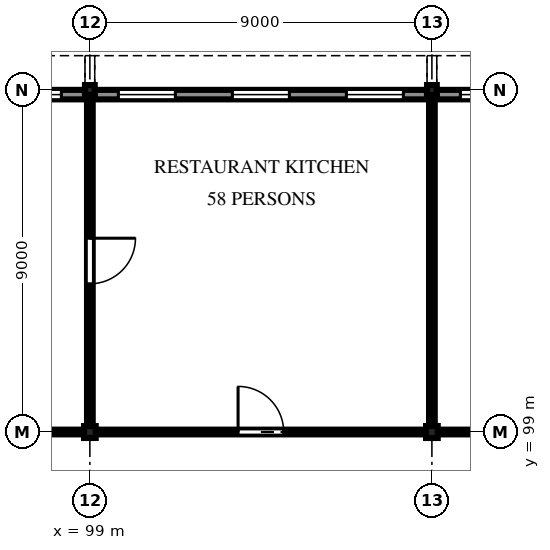
"""IFC4 building model, lengths in metres.
Left out: names, types, materials, properties, quantities, classifications, styles, units other than length and angle.
Written with IfcOpenShell. Run it as: python <this file> out.ifc"""

import sys

from ifc_helpers import new_model, si_unit, direction, frame, frame_2d, origin, origin_2d, place, context, subcontext, project, spatial, polyline, rectangle, i_section, outline, extrude, element, fill, save


model = new_model("IFC4")
c1 = context("Model", 3, precision=1e-05, world=origin(), true_north=direction((0.0, 1.0)))
c2 = subcontext(c1, "Body", "Model", "MODEL_VIEW")
j1 = project(units=[si_unit("LENGTHUNIT", "METRE"), si_unit("PLANEANGLEUNIT", "RADIAN")], contexts=[c1])
p1 = place(None, origin())
s1 = spatial("IfcSite", under=j1, at=p1, CompositionType="ELEMENT")
p2 = place(p1, origin())
s2 = spatial("IfcBuilding", under=s1, at=p2, CompositionType="ELEMENT")
p3 = place(p2, frame((0.0, 0.0, 7.5)))
s3 = spatial("IfcBuildingStorey", under=s2, at=p3, CompositionType="ELEMENT", Elevation=7.5)
p4 = place(p3, frame((99.0, 99.0, 0.0), z_axis=(0.0, 0.0, 1.0), x_axis=(1.0, 0.0, 0.0)))
e1 = element("IfcColumn", 1, at=p4, inside=s3, PredefinedType="COLUMN", context=c2, shape_type="SweptSolid", body=[
    extrude(i_section(OverallWidth=0.307, OverallDepth=0.314, WebThickness=0.012, FlangeThickness=0.019, FilletRadius=0.015, at=origin_2d()), origin(), (0.0, 0.0, 1.0), 4.2),
])
p5 = place(p3, frame((99.0, 108.0, 0.0), z_axis=(0.0, 0.0, 1.0), x_axis=(1.0, 0.0, 0.0)))
e2 = element("IfcColumn", 2, at=p5, inside=s3, PredefinedType="COLUMN", context=c2, shape_type="SweptSolid", body=[
    extrude(i_section(OverallWidth=0.256, OverallDepth=0.26, WebThickness=0.01, FlangeThickness=0.017, FilletRadius=0.013, at=origin_2d()), origin(), (0.0, 0.0, 1.0), 4.2),
])
p6 = place(p3, frame((108.0, 99.0, 0.0), z_axis=(0.0, 0.0, 1.0), x_axis=(1.0, 0.0, 0.0)))
e3 = element("IfcColumn", 3, at=p6, inside=s3, PredefinedType="COLUMN", context=c2, shape_type="SweptSolid", body=[
    extrude(i_section(OverallWidth=0.307, OverallDepth=0.314, WebThickness=0.012, FlangeThickness=0.019, FilletRadius=0.015, at=origin_2d()), origin(), (0.0, 0.0, 1.0), 4.2),
])
p7 = place(p3, frame((108.0, 108.0, 0.0), z_axis=(0.0, 0.0, 1.0), x_axis=(1.0, 0.0, 0.0)))
e4 = element("IfcColumn", 4, at=p7, inside=s3, PredefinedType="COLUMN", context=c2, shape_type="SweptSolid", body=[
    extrude(i_section(OverallWidth=0.256, OverallDepth=0.26, WebThickness=0.01, FlangeThickness=0.017, FilletRadius=0.013, at=origin_2d()), origin(), (0.0, 0.0, 1.0), 4.2),
])
p8 = place(p3, frame((90.128, 107.878, 0.0), z_axis=(0.0, 0.0, 1.0), x_axis=(1.0, 0.0, 0.0)))
e5 = element("IfcWall", 5, at=p8, inside=s3, PredefinedType="SOLIDWALL", context=c2, shape_type="SweptSolid", body=[
    extrude(rectangle(XDim=8.744, YDim=0.25, at=frame_2d((4.372, 0.0))), origin(), (0.0, 0.0, 1.0), 4.05),
])
p9 = place(p8, frame((0.622, 0.0, 0.9)))
e6 = element("IfcOpeningElement", 6, at=p9, cuts=e5, PredefinedType="OPENING", context=c2, shape_type="SweptSolid", body=[
    extrude(rectangle(XDim=1.5, YDim=2.4, at=frame_2d((0.75, 1.2))), frame((0.0, 0.135, 0.0), z_axis=(0.0, -1.0, 0.0), x_axis=(1.0, 0.0, 0.0)), (0.0, 0.0, 1.0), 0.27),
])
p10 = place(p8, frame((3.622, 0.0, 0.9)))
e7 = element("IfcOpeningElement", 7, at=p10, cuts=e5, PredefinedType="OPENING", context=c2, shape_type="SweptSolid", body=[
    extrude(rectangle(XDim=1.5, YDim=2.4, at=frame_2d((0.75, 1.2))), frame((0.0, 0.135, 0.0), z_axis=(0.0, -1.0, 0.0), x_axis=(1.0, 0.0, 0.0)), (0.0, 0.0, 1.0), 0.27),
])
p11 = place(p8, frame((6.622, 0.0, 0.9)))
e8 = element("IfcOpeningElement", 8, at=p11, cuts=e5, PredefinedType="OPENING", context=c2, shape_type="SweptSolid", body=[
    extrude(rectangle(XDim=1.5, YDim=2.4, at=frame_2d((0.75, 1.2))), frame((0.0, 0.135, 0.0), z_axis=(0.0, -1.0, 0.0), x_axis=(1.0, 0.0, 0.0)), (0.0, 0.0, 1.0), 0.27),
])
p12 = place(p3, frame((99.128, 107.878, 0.0), z_axis=(0.0, 0.0, 1.0), x_axis=(1.0, 0.0, 0.0)))
e9 = element("IfcWall", 9, at=p12, inside=s3, PredefinedType="SOLIDWALL", context=c2, shape_type="SweptSolid", body=[
    extrude(rectangle(XDim=8.744, YDim=0.25, at=frame_2d((4.372, 0.0))), origin(), (0.0, 0.0, 1.0), 4.05),
])
p13 = place(p12, frame((0.622, 0.0, 0.9)))
e10 = element("IfcOpeningElement", 10, at=p13, cuts=e9, PredefinedType="OPENING", context=c2, shape_type="SweptSolid", body=[
    extrude(rectangle(XDim=1.5, YDim=2.4, at=frame_2d((0.75, 1.2))), frame((0.0, 0.135, 0.0), z_axis=(0.0, -1.0, 0.0), x_axis=(1.0, 0.0, 0.0)), (0.0, 0.0, 1.0), 0.27),
])
p14 = place(p12, frame((3.622, 0.0, 0.9)))
e11 = element("IfcOpeningElement", 11, at=p14, cuts=e9, PredefinedType="OPENING", context=c2, shape_type="SweptSolid", body=[
    extrude(rectangle(XDim=1.5, YDim=2.4, at=frame_2d((0.75, 1.2))), frame((0.0, 0.135, 0.0), z_axis=(0.0, -1.0, 0.0), x_axis=(1.0, 0.0, 0.0)), (0.0, 0.0, 1.0), 0.27),
])
p15 = place(p12, frame((6.622, 0.0, 0.9)))
e12 = element("IfcOpeningElement", 12, at=p15, cuts=e9, PredefinedType="OPENING", context=c2, shape_type="SweptSolid", body=[
    extrude(rectangle(XDim=1.5, YDim=2.4, at=frame_2d((0.75, 1.2))), frame((0.0, 0.135, 0.0), z_axis=(0.0, -1.0, 0.0), x_axis=(1.0, 0.0, 0.0)), (0.0, 0.0, 1.0), 0.27),
])
p16 = place(p3, frame((108.128, 107.878, 0.0), z_axis=(0.0, 0.0, 1.0), x_axis=(1.0, 0.0, 0.0)))
e13 = element("IfcWall", 13, at=p16, inside=s3, PredefinedType="SOLIDWALL", context=c2, shape_type="SweptSolid", body=[
    extrude(rectangle(XDim=8.744, YDim=0.25, at=frame_2d((4.372, 0.0))), origin(), (0.0, 0.0, 1.0), 4.05),
])
p17 = place(p16, frame((0.622, 0.0, 0.9)))
e14 = element("IfcOpeningElement", 14, at=p17, cuts=e13, PredefinedType="OPENING", context=c2, shape_type="SweptSolid", body=[
    extrude(rectangle(XDim=1.5, YDim=2.4, at=frame_2d((0.75, 1.2))), frame((0.0, 0.135, 0.0), z_axis=(0.0, -1.0, 0.0), x_axis=(1.0, 0.0, 0.0)), (0.0, 0.0, 1.0), 0.27),
])
p18 = place(p16, frame((3.622, 0.0, 0.9)))
e15 = element("IfcOpeningElement", 15, at=p18, cuts=e13, PredefinedType="OPENING", context=c2, shape_type="SweptSolid", body=[
    extrude(rectangle(XDim=1.5, YDim=2.4, at=frame_2d((0.75, 1.2))), frame((0.0, 0.135, 0.0), z_axis=(0.0, -1.0, 0.0), x_axis=(1.0, 0.0, 0.0)), (0.0, 0.0, 1.0), 0.27),
])
p19 = place(p16, frame((6.622, 0.0, 0.9)))
e16 = element("IfcOpeningElement", 16, at=p19, cuts=e13, PredefinedType="OPENING", context=c2, shape_type="SweptSolid", body=[
    extrude(rectangle(XDim=1.5, YDim=2.4, at=frame_2d((0.75, 1.2))), frame((0.0, 0.135, 0.0), z_axis=(0.0, -1.0, 0.0), x_axis=(1.0, 0.0, 0.0)), (0.0, 0.0, 1.0), 0.27),
])
p20 = place(p3, frame((108.154, 99.0, 0.0), z_axis=(0.0, 0.0, 1.0), x_axis=(1.0, 0.0, 0.0)))
e17 = element("IfcWall", 17, at=p20, inside=s3, PredefinedType="PARTITIONING", context=c2, shape_type="SweptSolid", body=[
    extrude(rectangle(XDim=8.692, YDim=0.125, at=frame_2d((4.346, 0.0))), origin(), (0.0, 0.0, 1.0), 3.307),
])
p21 = place(p20, frame((3.846, 0.0, 0.0)))
e18 = element("IfcOpeningElement", 18, at=p21, cuts=e17, PredefinedType="OPENING", context=c2, shape_type="SweptSolid", body=[
    extrude(rectangle(XDim=1.0, YDim=2.1, at=frame_2d((0.5, 1.05))), frame((0.0, 0.073, 0.0), z_axis=(0.0, -1.0, 0.0), x_axis=(1.0, 0.0, 0.0)), (0.0, 0.0, 1.0), 0.145),
])
p22 = place(p3, frame((99.154, 99.0, 0.0), z_axis=(0.0, 0.0, 1.0), x_axis=(1.0, 0.0, 0.0)))
e19 = element("IfcWall", 19, at=p22, inside=s3, PredefinedType="PARTITIONING", context=c2, shape_type="SweptSolid", body=[
    extrude(rectangle(XDim=8.692, YDim=0.125, at=frame_2d((4.346, 0.0))), origin(), (0.0, 0.0, 1.0), 3.307),
])
p23 = place(p22, frame((3.746, 0.0, 0.0)))
e20 = element("IfcOpeningElement", 20, at=p23, cuts=e19, PredefinedType="OPENING", context=c2, shape_type="SweptSolid", body=[
    extrude(rectangle(XDim=1.2, YDim=2.1, at=frame_2d((0.6, 1.05))), frame((0.0, 0.073, 0.0), z_axis=(0.0, -1.0, 0.0), x_axis=(1.0, 0.0, 0.0)), (0.0, 0.0, 1.0), 0.145),
])
p24 = place(p3, frame((90.154, 99.0, 0.0), z_axis=(0.0, 0.0, 1.0), x_axis=(1.0, 0.0, 0.0)))
e21 = element("IfcWall", 21, at=p24, inside=s3, PredefinedType="PARTITIONING", context=c2, shape_type="SweptSolid", body=[
    extrude(rectangle(XDim=8.692, YDim=0.125, at=frame_2d((4.346, 0.0))), origin(), (0.0, 0.0, 1.0), 3.307),
])
p25 = place(p24, frame((3.346, 0.0, 0.0)))
e22 = element("IfcOpeningElement", 22, at=p25, cuts=e21, PredefinedType="OPENING", context=c2, shape_type="SweptSolid", body=[
    extrude(rectangle(XDim=2.0, YDim=2.4, at=frame_2d((1.0, 1.2))), frame((0.0, 0.073, 0.0), z_axis=(0.0, -1.0, 0.0), x_axis=(1.0, 0.0, 0.0)), (0.0, 0.0, 1.0), 0.145),
])
p26 = place(p3, frame((99.0, 107.87, 0.0), z_axis=(0.0, 0.0, 1.0), x_axis=(0.0, -1.0, 0.0)))
e23 = element("IfcWall", 23, at=p26, inside=s3, PredefinedType="PARTITIONING", context=c2, shape_type="SweptSolid", body=[
    extrude(rectangle(XDim=8.713, YDim=0.15, at=frame_2d((4.356, 0.0))), origin(), (0.0, 0.0, 1.0), 3.307),
])
p27 = place(p26, frame((3.77, 0.0, 0.0)))
e24 = element("IfcOpeningElement", 24, at=p27, cuts=e23, PredefinedType="OPENING", context=c2, shape_type="SweptSolid", body=[
    extrude(rectangle(XDim=1.2, YDim=2.1, at=frame_2d((0.6, 1.05))), frame((0.0, 0.085, 0.0), z_axis=(0.0, -1.0, 0.0), x_axis=(1.0, 0.0, 0.0)), (0.0, 0.0, 1.0), 0.17),
])
p28 = place(p3, frame((108.0, 107.87, 0.0), z_axis=(0.0, 0.0, 1.0), x_axis=(0.0, -1.0, 0.0)))
e25 = element("IfcWall", 25, at=p28, inside=s3, PredefinedType="PARTITIONING", context=c2, shape_type="SweptSolid", body=[
    extrude(rectangle(XDim=8.713, YDim=0.15, at=frame_2d((4.356, 0.0))), origin(), (0.0, 0.0, 1.0), 3.307),
])
p29 = place(p11, origin())
e26 = element("IfcWindow", 26, at=p29, inside=s3, PartitioningType="DOUBLE_PANEL_VERTICAL", PredefinedType="WINDOW", context=c2, shape_type="SweptSolid", body=[
    extrude(outline(polyline([(0.0, 0.0), (1.5, 0.0), (1.5, 2.4), (0.0, 2.4), (0.0, 0.0)]), holes=[polyline([(0.07, 0.07), (1.43, 0.07), (1.43, 2.33), (0.07, 2.33), (0.07, 0.07)])]), frame((0.0, 0.03, 0.0), z_axis=(0.0, -1.0, 0.0), x_axis=(1.0, 0.0, 0.0)), (0.0, 0.0, 1.0), 0.06),
    extrude(rectangle(XDim=0.04, YDim=2.26, at=frame_2d((0.75, 1.2))), frame((0.0, 0.022, 0.0), z_axis=(0.0, -1.0, 0.0), x_axis=(1.0, 0.0, 0.0)), (0.0, 0.0, 1.0), 0.044),
    extrude(outline(polyline([(0.07, 0.07), (0.73, 0.07), (0.73, 2.33), (0.07, 2.33), (0.07, 0.07)]), holes=[polyline([(0.1, 0.1), (0.7, 0.1), (0.7, 2.3), (0.1, 2.3), (0.1, 0.1)])]), frame((0.0, 0.022, 0.0), z_axis=(0.0, -1.0, 0.0), x_axis=(1.0, 0.0, 0.0)), (0.0, 0.0, 1.0), 0.045),
    extrude(rectangle(XDim=0.6, YDim=2.2, at=frame_2d((0.4, 1.2))), frame((0.0, 0.006, 0.0), z_axis=(0.0, -1.0, 0.0), x_axis=(1.0, 0.0, 0.0)), (0.0, 0.0, 1.0), 0.012),
    extrude(outline(polyline([(0.77, 0.07), (1.43, 0.07), (1.43, 2.33), (0.77, 2.33), (0.77, 0.07)]), holes=[polyline([(0.8, 0.1), (1.4, 0.1), (1.4, 2.3), (0.8, 2.3), (0.8, 0.1)])]), frame((0.0, 0.022, 0.0), z_axis=(0.0, -1.0, 0.0), x_axis=(1.0, 0.0, 0.0)), (0.0, 0.0, 1.0), 0.045),
    extrude(rectangle(XDim=0.6, YDim=2.2, at=frame_2d((1.1, 1.2))), frame((0.0, 0.006, 0.0), z_axis=(0.0, -1.0, 0.0), x_axis=(1.0, 0.0, 0.0)), (0.0, 0.0, 1.0), 0.012),
])
fill(e8, e26)
p30 = place(p13, origin())
e27 = element("IfcWindow", 27, at=p30, inside=s3, PartitioningType="DOUBLE_PANEL_VERTICAL", PredefinedType="WINDOW", context=c2, shape_type="SweptSolid", body=[
    extrude(outline(polyline([(0.0, 0.0), (1.5, 0.0), (1.5, 2.4), (0.0, 2.4), (0.0, 0.0)]), holes=[polyline([(0.07, 0.07), (1.43, 0.07), (1.43, 2.33), (0.07, 2.33), (0.07, 0.07)])]), frame((0.0, 0.03, 0.0), z_axis=(0.0, -1.0, 0.0), x_axis=(1.0, 0.0, 0.0)), (0.0, 0.0, 1.0), 0.06),
    extrude(rectangle(XDim=0.04, YDim=2.26, at=frame_2d((0.75, 1.2))), frame((0.0, 0.022, 0.0), z_axis=(0.0, -1.0, 0.0), x_axis=(1.0, 0.0, 0.0)), (0.0, 0.0, 1.0), 0.044),
    extrude(outline(polyline([(0.07, 0.07), (0.73, 0.07), (0.73, 2.33), (0.07, 2.33), (0.07, 0.07)]), holes=[polyline([(0.1, 0.1), (0.7, 0.1), (0.7, 2.3), (0.1, 2.3), (0.1, 0.1)])]), frame((0.0, 0.022, 0.0), z_axis=(0.0, -1.0, 0.0), x_axis=(1.0, 0.0, 0.0)), (0.0, 0.0, 1.0), 0.045),
    extrude(rectangle(XDim=0.6, YDim=2.2, at=frame_2d((0.4, 1.2))), frame((0.0, 0.006, 0.0), z_axis=(0.0, -1.0, 0.0), x_axis=(1.0, 0.0, 0.0)), (0.0, 0.0, 1.0), 0.012),
    extrude(outline(polyline([(0.77, 0.07), (1.43, 0.07), (1.43, 2.33), (0.77, 2.33), (0.77, 0.07)]), holes=[polyline([(0.8, 0.1), (1.4, 0.1), (1.4, 2.3), (0.8, 2.3), (0.8, 0.1)])]), frame((0.0, 0.022, 0.0), z_axis=(0.0, -1.0, 0.0), x_axis=(1.0, 0.0, 0.0)), (0.0, 0.0, 1.0), 0.045),
    extrude(rectangle(XDim=0.6, YDim=2.2, at=frame_2d((1.1, 1.2))), frame((0.0, 0.006, 0.0), z_axis=(0.0, -1.0, 0.0), x_axis=(1.0, 0.0, 0.0)), (0.0, 0.0, 1.0), 0.012),
])
fill(e10, e27)
p31 = place(p14, origin())
e28 = element("IfcWindow", 28, at=p31, inside=s3, PartitioningType="DOUBLE_PANEL_VERTICAL", PredefinedType="WINDOW", context=c2, shape_type="SweptSolid", body=[
    extrude(outline(polyline([(0.0, 0.0), (1.5, 0.0), (1.5, 2.4), (0.0, 2.4), (0.0, 0.0)]), holes=[polyline([(0.07, 0.07), (1.43, 0.07), (1.43, 2.33), (0.07, 2.33), (0.07, 0.07)])]), frame((0.0, 0.03, 0.0), z_axis=(0.0, -1.0, 0.0), x_axis=(1.0, 0.0, 0.0)), (0.0, 0.0, 1.0), 0.06),
    extrude(rectangle(XDim=0.04, YDim=2.26, at=frame_2d((0.75, 1.2))), frame((0.0, 0.022, 0.0), z_axis=(0.0, -1.0, 0.0), x_axis=(1.0, 0.0, 0.0)), (0.0, 0.0, 1.0), 0.044),
    extrude(outline(polyline([(0.07, 0.07), (0.73, 0.07), (0.73, 2.33), (0.07, 2.33), (0.07, 0.07)]), holes=[polyline([(0.1, 0.1), (0.7, 0.1), (0.7, 2.3), (0.1, 2.3), (0.1, 0.1)])]), frame((0.0, 0.022, 0.0), z_axis=(0.0, -1.0, 0.0), x_axis=(1.0, 0.0, 0.0)), (0.0, 0.0, 1.0), 0.045),
    extrude(rectangle(XDim=0.6, YDim=2.2, at=frame_2d((0.4, 1.2))), frame((0.0, 0.006, 0.0), z_axis=(0.0, -1.0, 0.0), x_axis=(1.0, 0.0, 0.0)), (0.0, 0.0, 1.0), 0.012),
    extrude(outline(polyline([(0.77, 0.07), (1.43, 0.07), (1.43, 2.33), (0.77, 2.33), (0.77, 0.07)]), holes=[polyline([(0.8, 0.1), (1.4, 0.1), (1.4, 2.3), (0.8, 2.3), (0.8, 0.1)])]), frame((0.0, 0.022, 0.0), z_axis=(0.0, -1.0, 0.0), x_axis=(1.0, 0.0, 0.0)), (0.0, 0.0, 1.0), 0.045),
    extrude(rectangle(XDim=0.6, YDim=2.2, at=frame_2d((1.1, 1.2))), frame((0.0, 0.006, 0.0), z_axis=(0.0, -1.0, 0.0), x_axis=(1.0, 0.0, 0.0)), (0.0, 0.0, 1.0), 0.012),
])
fill(e11, e28)
p32 = place(p15, origin())
e29 = element("IfcWindow", 29, at=p32, inside=s3, PartitioningType="DOUBLE_PANEL_VERTICAL", PredefinedType="WINDOW", context=c2, shape_type="SweptSolid", body=[
    extrude(outline(polyline([(0.0, 0.0), (1.5, 0.0), (1.5, 2.4), (0.0, 2.4), (0.0, 0.0)]), holes=[polyline([(0.07, 0.07), (1.43, 0.07), (1.43, 2.33), (0.07, 2.33), (0.07, 0.07)])]), frame((0.0, 0.03, 0.0), z_axis=(0.0, -1.0, 0.0), x_axis=(1.0, 0.0, 0.0)), (0.0, 0.0, 1.0), 0.06),
    extrude(rectangle(XDim=0.04, YDim=2.26, at=frame_2d((0.75, 1.2))), frame((0.0, 0.022, 0.0), z_axis=(0.0, -1.0, 0.0), x_axis=(1.0, 0.0, 0.0)), (0.0, 0.0, 1.0), 0.044),
    extrude(outline(polyline([(0.07, 0.07), (0.73, 0.07), (0.73, 2.33), (0.07, 2.33), (0.07, 0.07)]), holes=[polyline([(0.1, 0.1), (0.7, 0.1), (0.7, 2.3), (0.1, 2.3), (0.1, 0.1)])]), frame((0.0, 0.022, 0.0), z_axis=(0.0, -1.0, 0.0), x_axis=(1.0, 0.0, 0.0)), (0.0, 0.0, 1.0), 0.045),
    extrude(rectangle(XDim=0.6, YDim=2.2, at=frame_2d((0.4, 1.2))), frame((0.0, 0.006, 0.0), z_axis=(0.0, -1.0, 0.0), x_axis=(1.0, 0.0, 0.0)), (0.0, 0.0, 1.0), 0.012),
    extrude(outline(polyline([(0.77, 0.07), (1.43, 0.07), (1.43, 2.33), (0.77, 2.33), (0.77, 0.07)]), holes=[polyline([(0.8, 0.1), (1.4, 0.1), (1.4, 2.3), (0.8, 2.3), (0.8, 0.1)])]), frame((0.0, 0.022, 0.0), z_axis=(0.0, -1.0, 0.0), x_axis=(1.0, 0.0, 0.0)), (0.0, 0.0, 1.0), 0.045),
    extrude(rectangle(XDim=0.6, YDim=2.2, at=frame_2d((1.1, 1.2))), frame((0.0, 0.006, 0.0), z_axis=(0.0, -1.0, 0.0), x_axis=(1.0, 0.0, 0.0)), (0.0, 0.0, 1.0), 0.012),
])
fill(e12, e29)
p33 = place(p17, origin())
e30 = element("IfcWindow", 30, at=p33, inside=s3, PartitioningType="DOUBLE_PANEL_VERTICAL", PredefinedType="WINDOW", context=c2, shape_type="SweptSolid", body=[
    extrude(outline(polyline([(0.0, 0.0), (1.5, 0.0), (1.5, 2.4), (0.0, 2.4), (0.0, 0.0)]), holes=[polyline([(0.07, 0.07), (1.43, 0.07), (1.43, 2.33), (0.07, 2.33), (0.07, 0.07)])]), frame((0.0, 0.03, 0.0), z_axis=(0.0, -1.0, 0.0), x_axis=(1.0, 0.0, 0.0)), (0.0, 0.0, 1.0), 0.06),
    extrude(rectangle(XDim=0.04, YDim=2.26, at=frame_2d((0.75, 1.2))), frame((0.0, 0.022, 0.0), z_axis=(0.0, -1.0, 0.0), x_axis=(1.0, 0.0, 0.0)), (0.0, 0.0, 1.0), 0.044),
    extrude(outline(polyline([(0.07, 0.07), (0.73, 0.07), (0.73, 2.33), (0.07, 2.33), (0.07, 0.07)]), holes=[polyline([(0.1, 0.1), (0.7, 0.1), (0.7, 2.3), (0.1, 2.3), (0.1, 0.1)])]), frame((0.0, 0.022, 0.0), z_axis=(0.0, -1.0, 0.0), x_axis=(1.0, 0.0, 0.0)), (0.0, 0.0, 1.0), 0.045),
    extrude(rectangle(XDim=0.6, YDim=2.2, at=frame_2d((0.4, 1.2))), frame((0.0, 0.006, 0.0), z_axis=(0.0, -1.0, 0.0), x_axis=(1.0, 0.0, 0.0)), (0.0, 0.0, 1.0), 0.012),
    extrude(outline(polyline([(0.77, 0.07), (1.43, 0.07), (1.43, 2.33), (0.77, 2.33), (0.77, 0.07)]), holes=[polyline([(0.8, 0.1), (1.4, 0.1), (1.4, 2.3), (0.8, 2.3), (0.8, 0.1)])]), frame((0.0, 0.022, 0.0), z_axis=(0.0, -1.0, 0.0), x_axis=(1.0, 0.0, 0.0)), (0.0, 0.0, 1.0), 0.045),
    extrude(rectangle(XDim=0.6, YDim=2.2, at=frame_2d((1.1, 1.2))), frame((0.0, 0.006, 0.0), z_axis=(0.0, -1.0, 0.0), x_axis=(1.0, 0.0, 0.0)), (0.0, 0.0, 1.0), 0.012),
])
fill(e14, e30)
p34 = place(p23, origin())
e31 = element("IfcDoor", 31, at=p34, inside=s3, OperationType="DOUBLE_DOOR_SINGLE_SWING", PredefinedType="DOOR", context=c2, shape_type="SweptSolid", body=[
    extrude(outline(polyline([(0.0, 0.0), (0.07, 0.0), (0.07, 2.03), (1.13, 2.03), (1.13, 0.0), (1.2, 0.0), (1.2, 2.1), (0.0, 2.1), (0.0, 0.0)])), frame((0.0, 0.025, 0.0), z_axis=(0.0, -1.0, 0.0), x_axis=(1.0, 0.0, 0.0)), (0.0, 0.0, 1.0), 0.05),
    extrude(outline(polyline([(0.074, 0.01), (0.597, 0.01), (0.597, 2.026), (0.074, 2.026), (0.074, 0.01)]), holes=[polyline([(0.178, 0.373), (0.492, 0.373), (0.492, 1.784), (0.178, 1.784), (0.178, 0.373)])]), frame((0.0, 0.017, 0.0), z_axis=(0.0, -1.0, 0.0), x_axis=(1.0, 0.0, 0.0)), (0.0, 0.0, 1.0), 0.035),
    extrude(rectangle(XDim=0.314, YDim=1.411, at=frame_2d((0.335, 1.079))), frame((0.0, 0.009, 0.0), z_axis=(0.0, -1.0, 0.0), x_axis=(1.0, 0.0, 0.0)), (0.0, 0.0, 1.0), 0.017),
    extrude(outline(polyline([(0.603, 0.01), (1.126, 0.01), (1.126, 2.026), (0.603, 2.026), (0.603, 0.01)]), holes=[polyline([(0.708, 0.373), (1.021, 0.373), (1.021, 1.784), (0.708, 1.784), (0.708, 0.373)])]), frame((0.0, 0.017, 0.0), z_axis=(0.0, -1.0, 0.0), x_axis=(1.0, 0.0, 0.0)), (0.0, 0.0, 1.0), 0.035),
    extrude(rectangle(XDim=0.314, YDim=1.411, at=frame_2d((0.865, 1.079))), frame((0.0, 0.009, 0.0), z_axis=(0.0, -1.0, 0.0), x_axis=(1.0, 0.0, 0.0)), (0.0, 0.0, 1.0), 0.017),
])
fill(e20, e31)
p35 = place(p27, origin())
e32 = element("IfcDoor", 32, at=p35, inside=s3, OperationType="DOUBLE_DOOR_SINGLE_SWING", PredefinedType="DOOR", context=c2, shape_type="SweptSolid", body=[
    extrude(outline(polyline([(0.0, 0.0), (0.07, 0.0), (0.07, 2.03), (1.13, 2.03), (1.13, 0.0), (1.2, 0.0), (1.2, 2.1), (0.0, 2.1), (0.0, 0.0)])), frame((0.0, 0.025, 0.0), z_axis=(0.0, -1.0, 0.0), x_axis=(1.0, 0.0, 0.0)), (0.0, 0.0, 1.0), 0.05),
    extrude(outline(polyline([(0.074, 0.01), (0.597, 0.01), (0.597, 2.026), (0.074, 2.026), (0.074, 0.01)]), holes=[polyline([(0.178, 0.373), (0.492, 0.373), (0.492, 1.784), (0.178, 1.784), (0.178, 0.373)])]), frame((0.0, 0.017, 0.0), z_axis=(0.0, -1.0, 0.0), x_axis=(1.0, 0.0, 0.0)), (0.0, 0.0, 1.0), 0.035),
    extrude(rectangle(XDim=0.314, YDim=1.411, at=frame_2d((0.335, 1.079))), frame((0.0, 0.009, 0.0), z_axis=(0.0, -1.0, 0.0), x_axis=(1.0, 0.0, 0.0)), (0.0, 0.0, 1.0), 0.017),
    extrude(outline(polyline([(0.603, 0.01), (1.126, 0.01), (1.126, 2.026), (0.603, 2.026), (0.603, 0.01)]), holes=[polyline([(0.708, 0.373), (1.021, 0.373), (1.021, 1.784), (0.708, 1.784), (0.708, 0.373)])]), frame((0.0, 0.017, 0.0), z_axis=(0.0, -1.0, 0.0), x_axis=(1.0, 0.0, 0.0)), (0.0, 0.0, 1.0), 0.035),
    extrude(rectangle(XDim=0.314, YDim=1.411, at=frame_2d((0.865, 1.079))), frame((0.0, 0.009, 0.0), z_axis=(0.0, -1.0, 0.0), x_axis=(1.0, 0.0, 0.0)), (0.0, 0.0, 1.0), 0.017),
])
fill(e24, e32)
save(model, sys.argv[1])
